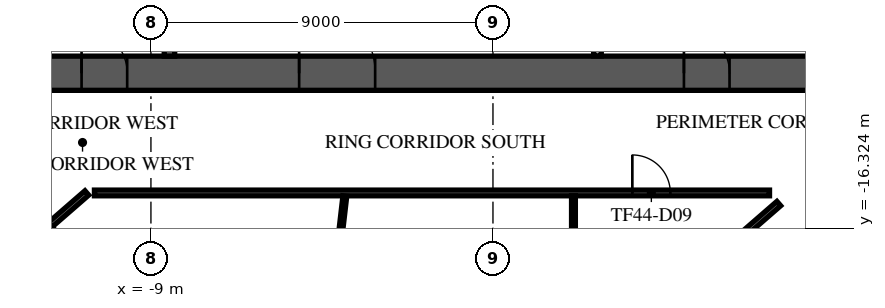
"""IFC4 building model, lengths in metres.
Left out: names, types, materials, properties, quantities, classifications, styles, units other than length and angle.
Written with IfcOpenShell. Run it as: python <this file> out.ifc"""

import sys

from ifc_helpers import new_model, si_unit, direction, frame, frame_2d, origin, place, context, subcontext, project, spatial, rectangle, extrude, element, fill, save


model = new_model("IFC4")
c1 = context("Model", 3, precision=1e-05, world=origin(), true_north=direction((0.0, 1.0)))
c2 = subcontext(c1, "Body", "Model", "MODEL_VIEW")
j1 = project(units=[si_unit("LENGTHUNIT", "METRE"), si_unit("PLANEANGLEUNIT", "RADIAN")], contexts=[c1])
p1 = place(None, origin())
s1 = spatial("IfcSite", under=j1, at=p1, CompositionType="ELEMENT")
p2 = place(p1, origin())
s2 = spatial("IfcBuilding", under=s1, at=p2, CompositionType="ELEMENT")
p3 = place(p2, frame((0.0, 0.0, 189.3)))
s3 = spatial("IfcBuildingStorey", under=s2, at=p3, CompositionType="ELEMENT", Elevation=189.3)
p4 = place(p3, frame((-12.7, -12.25, 0.0), z_axis=(0.0, 0.0, 1.0), x_axis=(1.0, 0.0, 0.0)))
e1 = element("IfcWall", 1, at=p4, inside=s3, PredefinedType="SHEAR", context=c2, shape_type="SweptSolid", body=[
    extrude(rectangle(XDim=25.4, YDim=0.9, at=frame_2d((12.7, 0.0))), origin(), (0.0, 0.0, 1.0), 3.62),
])
p5 = place(p4, frame((7.6, 0.0, 0.0)))
e2 = element("IfcOpeningElement", 2, at=p5, cuts=e1, PredefinedType="OPENING", context=c2, shape_type="SweptSolid", body=[
    extrude(rectangle(XDim=2.0, YDim=2.1, at=frame_2d((1.0, 1.05))), frame((0.0, 0.46, 0.0), z_axis=(0.0, -1.0, 0.0), x_axis=(1.0, 0.0, 0.0)), (0.0, 0.0, 1.0), 0.92),
])
p6 = place(p4, frame((17.725, 0.0, 0.0)))
e3 = element("IfcOpeningElement", 3, at=p6, cuts=e1, PredefinedType="OPENING", context=c2, shape_type="SweptSolid", body=[
    extrude(rectangle(XDim=1.2, YDim=2.1, at=frame_2d((0.6, 1.05))), frame((0.0, 0.46, 0.0), z_axis=(0.0, -1.0, 0.0), x_axis=(1.0, 0.0, 0.0)), (0.0, 0.0, 1.0), 0.92),
])
p7 = place(p4, frame((1.875, 0.0, 0.0)))
e4 = element("IfcOpeningElement", 4, at=p7, cuts=e1, PredefinedType="OPENING", context=c2, shape_type="SweptSolid", body=[
    extrude(rectangle(XDim=1.2, YDim=2.1, at=frame_2d((0.6, 1.05))), frame((0.0, 0.46, 0.0), z_axis=(0.0, -1.0, 0.0), x_axis=(1.0, 0.0, 0.0)), (0.0, 0.0, 1.0), 0.92),
])
p8 = place(p4, frame((22.325, 0.0, 0.0)))
e5 = element("IfcOpeningElement", 5, at=p8, cuts=e1, PredefinedType="OPENING", context=c2, shape_type="SweptSolid", body=[
    extrude(rectangle(XDim=1.2, YDim=2.1, at=frame_2d((0.6, 1.05))), frame((0.0, 0.46, 0.0), z_axis=(0.0, -1.0, 0.0), x_axis=(1.0, 0.0, 0.0)), (0.0, 0.0, 1.0), 0.92),
])
p9 = place(p3, frame((-8.512, -4.55, 0.0), z_axis=(0.0, 0.0, 1.0), x_axis=(0.0, -1.0, 0.0)))
e6 = element("IfcWall", 6, at=p9, inside=s3, PredefinedType="SOLIDWALL", context=c2, shape_type="SweptSolid", body=[
    extrude(rectangle(XDim=7.25, YDim=0.275, at=frame_2d((3.625, 0.0))), origin(), (0.0, 0.0, 1.0), 3.62),
])
p10 = place(p9, frame((6.0, 0.0, 0.0)))
e7 = element("IfcOpeningElement", 7, at=p10, cuts=e6, PredefinedType="OPENING", context=c2, shape_type="SweptSolid", body=[
    extrude(rectangle(XDim=1.0, YDim=2.1, at=frame_2d((0.5, 1.05))), frame((0.0, 0.147, 0.0), z_axis=(0.0, -1.0, 0.0), x_axis=(1.0, 0.0, 0.0)), (0.0, 0.0, 1.0), 0.295),
])
p11 = place(p3, frame((2.75, -11.795, 0.0), z_axis=(0.0, 0.0, 1.0), x_axis=(0.0, 1.0, 0.0)))
e8 = element("IfcWall", 8, at=p11, inside=s3, PredefinedType="PARTITIONING", context=c2, shape_type="SweptSolid", body=[
    extrude(rectangle(XDim=2.99, YDim=0.2, at=frame_2d((1.495, 0.0))), origin(), (0.0, 0.0, 1.0), 3.62),
])
p12 = place(p3, frame((-35.208, -4.768, 0.0), z_axis=(0.0, 0.0, 1.0), x_axis=(0.656058749455, -0.754709823219, 0.0)))
e9 = element("IfcWall", 9, at=p12, inside=s3, PredefinedType="STANDARD", context=c2, shape_type="SweptSolid", body=[
    extrude(rectangle(XDim=39.0, YDim=0.6, at=frame_2d((19.5, 0.0))), origin(), (0.0, 0.0, 1.0), 3.62),
])
p13 = place(p12, frame((1.217, 0.0, 0.9)))
e10 = element("IfcOpeningElement", 10, at=p13, cuts=e9, PredefinedType="OPENING", context=c2, shape_type="SweptSolid", body=[
    extrude(rectangle(XDim=1.9, YDim=2.1, at=frame_2d((0.95, 1.05))), frame((0.0, 0.31, 0.0), z_axis=(0.0, -1.0, 0.0), x_axis=(1.0, 0.0, 0.0)), (0.0, 0.0, 1.0), 0.62),
])
p14 = place(p12, frame((5.55, 0.0, 0.9)))
e11 = element("IfcOpeningElement", 11, at=p14, cuts=e9, PredefinedType="OPENING", context=c2, shape_type="SweptSolid", body=[
    extrude(rectangle(XDim=1.9, YDim=2.1, at=frame_2d((0.95, 1.05))), frame((0.0, 0.31, 0.0), z_axis=(0.0, -1.0, 0.0), x_axis=(1.0, 0.0, 0.0)), (0.0, 0.0, 1.0), 0.62),
])
p15 = place(p12, frame((9.883, 0.0, 0.9)))
e12 = element("IfcOpeningElement", 12, at=p15, cuts=e9, PredefinedType="OPENING", context=c2, shape_type="SweptSolid", body=[
    extrude(rectangle(XDim=1.9, YDim=2.1, at=frame_2d((0.95, 1.05))), frame((0.0, 0.31, 0.0), z_axis=(0.0, -1.0, 0.0), x_axis=(1.0, 0.0, 0.0)), (0.0, 0.0, 1.0), 0.62),
])
p16 = place(p12, frame((14.217, 0.0, 0.9)))
e13 = element("IfcOpeningElement", 13, at=p16, cuts=e9, PredefinedType="OPENING", context=c2, shape_type="SweptSolid", body=[
    extrude(rectangle(XDim=1.9, YDim=2.1, at=frame_2d((0.95, 1.05))), frame((0.0, 0.31, 0.0), z_axis=(0.0, -1.0, 0.0), x_axis=(1.0, 0.0, 0.0)), (0.0, 0.0, 1.0), 0.62),
])
p17 = place(p12, frame((18.55, 0.0, 0.9)))
e14 = element("IfcOpeningElement", 14, at=p17, cuts=e9, PredefinedType="OPENING", context=c2, shape_type="SweptSolid", body=[
    extrude(rectangle(XDim=1.9, YDim=2.1, at=frame_2d((0.95, 1.05))), frame((0.0, 0.31, 0.0), z_axis=(0.0, -1.0, 0.0), x_axis=(1.0, 0.0, 0.0)), (0.0, 0.0, 1.0), 0.62),
])
p18 = place(p12, frame((22.883, 0.0, 0.9)))
e15 = element("IfcOpeningElement", 15, at=p18, cuts=e9, PredefinedType="OPENING", context=c2, shape_type="SweptSolid", body=[
    extrude(rectangle(XDim=1.9, YDim=2.1, at=frame_2d((0.95, 1.05))), frame((0.0, 0.31, 0.0), z_axis=(0.0, -1.0, 0.0), x_axis=(1.0, 0.0, 0.0)), (0.0, 0.0, 1.0), 0.62),
])
p19 = place(p12, frame((27.217, 0.0, 0.9)))
e16 = element("IfcOpeningElement", 16, at=p19, cuts=e9, PredefinedType="OPENING", context=c2, shape_type="SweptSolid", body=[
    extrude(rectangle(XDim=1.9, YDim=2.1, at=frame_2d((0.95, 1.05))), frame((0.0, 0.31, 0.0), z_axis=(0.0, -1.0, 0.0), x_axis=(1.0, 0.0, 0.0)), (0.0, 0.0, 1.0), 0.62),
])
p20 = place(p12, frame((31.55, 0.0, 0.9)))
e17 = element("IfcOpeningElement", 17, at=p20, cuts=e9, PredefinedType="OPENING", context=c2, shape_type="SweptSolid", body=[
    extrude(rectangle(XDim=1.9, YDim=2.1, at=frame_2d((0.95, 1.05))), frame((0.0, 0.31, 0.0), z_axis=(0.0, -1.0, 0.0), x_axis=(1.0, 0.0, 0.0)), (0.0, 0.0, 1.0), 0.62),
])
p21 = place(p12, frame((35.883, 0.0, 0.9)))
e18 = element("IfcOpeningElement", 18, at=p21, cuts=e9, PredefinedType="OPENING", context=c2, shape_type="SweptSolid", body=[
    extrude(rectangle(XDim=1.9, YDim=2.1, at=frame_2d((0.95, 1.05))), frame((0.0, 0.31, 0.0), z_axis=(0.0, -1.0, 0.0), x_axis=(1.0, 0.0, 0.0)), (0.0, 0.0, 1.0), 0.62),
])
p22 = place(p3, frame((-2.286, -34.715, 0.0), z_axis=(0.0, 0.0, 1.0), x_axis=(0.754708272811, 0.656060532993, 0.0)))
e19 = element("IfcWall", 19, at=p22, inside=s3, PredefinedType="STANDARD", context=c2, shape_type="SweptSolid", body=[
    extrude(rectangle(XDim=49.0, YDim=0.6, at=frame_2d((24.5, 0.0))), origin(), (0.0, 0.0, 1.0), 3.62),
])
p23 = place(p22, frame((1.227, 0.0, 0.9)))
e20 = element("IfcOpeningElement", 20, at=p23, cuts=e19, PredefinedType="OPENING", context=c2, shape_type="SweptSolid", body=[
    extrude(rectangle(XDim=2.0, YDim=2.1, at=frame_2d((1.0, 1.05))), frame((0.0, 0.31, 0.0), z_axis=(0.0, -1.0, 0.0), x_axis=(1.0, 0.0, 0.0)), (0.0, 0.0, 1.0), 0.62),
])
p24 = place(p22, frame((5.682, 0.0, 0.9)))
e21 = element("IfcOpeningElement", 21, at=p24, cuts=e19, PredefinedType="OPENING", context=c2, shape_type="SweptSolid", body=[
    extrude(rectangle(XDim=2.0, YDim=2.1, at=frame_2d((1.0, 1.05))), frame((0.0, 0.31, 0.0), z_axis=(0.0, -1.0, 0.0), x_axis=(1.0, 0.0, 0.0)), (0.0, 0.0, 1.0), 0.62),
])
p25 = place(p22, frame((10.136, 0.0, 0.9)))
e22 = element("IfcOpeningElement", 22, at=p25, cuts=e19, PredefinedType="OPENING", context=c2, shape_type="SweptSolid", body=[
    extrude(rectangle(XDim=2.0, YDim=2.1, at=frame_2d((1.0, 1.05))), frame((0.0, 0.31, 0.0), z_axis=(0.0, -1.0, 0.0), x_axis=(1.0, 0.0, 0.0)), (0.0, 0.0, 1.0), 0.62),
])
p26 = place(p22, frame((14.591, 0.0, 0.9)))
e23 = element("IfcOpeningElement", 23, at=p26, cuts=e19, PredefinedType="OPENING", context=c2, shape_type="SweptSolid", body=[
    extrude(rectangle(XDim=2.0, YDim=2.1, at=frame_2d((1.0, 1.05))), frame((0.0, 0.31, 0.0), z_axis=(0.0, -1.0, 0.0), x_axis=(1.0, 0.0, 0.0)), (0.0, 0.0, 1.0), 0.62),
])
p27 = place(p22, frame((19.045, 0.0, 0.9)))
e24 = element("IfcOpeningElement", 24, at=p27, cuts=e19, PredefinedType="OPENING", context=c2, shape_type="SweptSolid", body=[
    extrude(rectangle(XDim=2.0, YDim=2.1, at=frame_2d((1.0, 1.05))), frame((0.0, 0.31, 0.0), z_axis=(0.0, -1.0, 0.0), x_axis=(1.0, 0.0, 0.0)), (0.0, 0.0, 1.0), 0.62),
])
p28 = place(p22, frame((23.5, 0.0, 0.9)))
e25 = element("IfcOpeningElement", 25, at=p28, cuts=e19, PredefinedType="OPENING", context=c2, shape_type="SweptSolid", body=[
    extrude(rectangle(XDim=2.0, YDim=2.1, at=frame_2d((1.0, 1.05))), frame((0.0, 0.31, 0.0), z_axis=(0.0, -1.0, 0.0), x_axis=(1.0, 0.0, 0.0)), (0.0, 0.0, 1.0), 0.62),
])
p29 = place(p22, frame((27.955, 0.0, 0.9)))
e26 = element("IfcOpeningElement", 26, at=p29, cuts=e19, PredefinedType="OPENING", context=c2, shape_type="SweptSolid", body=[
    extrude(rectangle(XDim=2.0, YDim=2.1, at=frame_2d((1.0, 1.05))), frame((0.0, 0.31, 0.0), z_axis=(0.0, -1.0, 0.0), x_axis=(1.0, 0.0, 0.0)), (0.0, 0.0, 1.0), 0.62),
])
p30 = place(p22, frame((32.409, 0.0, 0.9)))
e27 = element("IfcOpeningElement", 27, at=p30, cuts=e19, PredefinedType="OPENING", context=c2, shape_type="SweptSolid", body=[
    extrude(rectangle(XDim=2.0, YDim=2.1, at=frame_2d((1.0, 1.05))), frame((0.0, 0.31, 0.0), z_axis=(0.0, -1.0, 0.0), x_axis=(1.0, 0.0, 0.0)), (0.0, 0.0, 1.0), 0.62),
])
p31 = place(p22, frame((36.864, 0.0, 0.9)))
e28 = element("IfcOpeningElement", 28, at=p31, cuts=e19, PredefinedType="OPENING", context=c2, shape_type="SweptSolid", body=[
    extrude(rectangle(XDim=2.0, YDim=2.1, at=frame_2d((1.0, 1.05))), frame((0.0, 0.31, 0.0), z_axis=(0.0, -1.0, 0.0), x_axis=(1.0, 0.0, 0.0)), (0.0, 0.0, 1.0), 0.62),
])
p32 = place(p22, frame((41.318, 0.0, 0.9)))
e29 = element("IfcOpeningElement", 29, at=p32, cuts=e19, PredefinedType="OPENING", context=c2, shape_type="SweptSolid", body=[
    extrude(rectangle(XDim=2.0, YDim=2.1, at=frame_2d((1.0, 1.05))), frame((0.0, 0.31, 0.0), z_axis=(0.0, -1.0, 0.0), x_axis=(1.0, 0.0, 0.0)), (0.0, 0.0, 1.0), 0.62),
])
p33 = place(p22, frame((45.773, 0.0, 0.9)))
e30 = element("IfcOpeningElement", 30, at=p33, cuts=e19, PredefinedType="OPENING", context=c2, shape_type="SweptSolid", body=[
    extrude(rectangle(XDim=2.0, YDim=2.1, at=frame_2d((1.0, 1.05))), frame((0.0, 0.31, 0.0), z_axis=(0.0, -1.0, 0.0), x_axis=(1.0, 0.0, 0.0)), (0.0, 0.0, 1.0), 0.62),
])
p34 = place(p3, frame((-24.98, -4.673, 0.0), z_axis=(0.0, 0.0, 1.0), x_axis=(0.656048444225, -0.754718781289, 0.0)))
e31 = element("IfcWall", 31, at=p34, inside=s3, PredefinedType="PARTITIONING", context=c2, shape_type="SweptSolid", body=[
    extrude(rectangle(XDim=25.8, YDim=0.15, at=frame_2d((12.9, 0.0))), origin(), (0.0, 0.0, 1.0), 3.17),
])
p35 = place(p34, frame((12.071, 0.0, 0.0)))
e32 = element("IfcOpeningElement", 32, at=p35, cuts=e31, PredefinedType="OPENING", context=c2, shape_type="SweptSolid", body=[
    extrude(rectangle(XDim=1.0, YDim=2.1, at=frame_2d((0.5, 1.05))), frame((0.0, 0.085, 0.0), z_axis=(0.0, -1.0, 0.0), x_axis=(1.0, 0.0, 0.0)), (0.0, 0.0, 1.0), 0.17),
])
p36 = place(p34, frame((24.318, 0.0, 0.0)))
e33 = element("IfcOpeningElement", 33, at=p36, cuts=e31, PredefinedType="OPENING", context=c2, shape_type="SweptSolid", body=[
    extrude(rectangle(XDim=1.0, YDim=2.1, at=frame_2d((0.5, 1.05))), frame((0.0, 0.085, 0.0), z_axis=(0.0, -1.0, 0.0), x_axis=(1.0, 0.0, 0.0)), (0.0, 0.0, 1.0), 0.17),
])
p37 = place(p3, frame((-11.705, -16.285, 0.0), z_axis=(0.0, 0.0, 1.0), x_axis=(0.656018266208, -0.754745012837, 0.0)))
e34 = element("IfcWall", 34, at=p37, inside=s3, PredefinedType="PARTITIONING", context=c2, shape_type="SweptSolid", body=[
    extrude(rectangle(XDim=8.326, YDim=0.15, at=frame_2d((4.163, 0.0))), origin(), (0.0, 0.0, 1.0), 3.17),
])
p38 = place(p3, frame((-11.648, -16.236, 0.0), z_axis=(0.0, 0.0, 1.0), x_axis=(0.754638525281, 0.656140759412, 0.0)))
e35 = element("IfcWall", 35, at=p38, inside=s3, PredefinedType="PARTITIONING", context=c2, shape_type="SweptSolid", body=[
    extrude(rectangle(XDim=1.274, YDim=0.15, at=frame_2d((0.637, 0.0))), origin(), (0.0, 0.0, 1.0), 3.17),
])
p39 = place(p3, frame((-10.486, -15.4, 0.0), z_axis=(0.0, 0.0, 1.0), x_axis=(1.0, 0.0, 0.0)))
e36 = element("IfcWall", 36, at=p39, inside=s3, PredefinedType="PARTITIONING", context=c2, shape_type="SweptSolid", body=[
    extrude(rectangle(XDim=17.763, YDim=0.15, at=frame_2d((8.882, 0.0))), origin(), (0.0, 0.0, 1.0), 3.17),
])
p40 = place(p39, frame((14.154, 0.0, 0.0)))
e37 = element("IfcOpeningElement", 37, at=p40, cuts=e36, PredefinedType="OPENING", context=c2, shape_type="SweptSolid", body=[
    extrude(rectangle(XDim=1.0, YDim=2.1, at=frame_2d((0.5, 1.05))), frame((0.0, 0.085, 0.0), z_axis=(0.0, -1.0, 0.0), x_axis=(1.0, 0.0, 0.0)), (0.0, 0.0, 1.0), 0.17),
])
p41 = place(p3, frame((-2.631, -24.505, 0.0), z_axis=(0.0, 0.0, 1.0), x_axis=(0.754714526528, 0.656053338874, 0.0)))
e38 = element("IfcWall", 38, at=p41, inside=s3, PredefinedType="PARTITIONING", context=c2, shape_type="SweptSolid", body=[
    extrude(rectangle(XDim=13.452, YDim=0.15, at=frame_2d((6.726, 0.0))), origin(), (0.0, 0.0, 1.0), 3.17),
])
p42 = place(p41, frame((3.05, 0.0, 0.0)))
e39 = element("IfcOpeningElement", 39, at=p42, cuts=e38, PredefinedType="OPENING", context=c2, shape_type="SweptSolid", body=[
    extrude(rectangle(XDim=1.0, YDim=2.1, at=frame_2d((0.5, 1.05))), frame((0.0, 0.085, 0.0), z_axis=(0.0, -1.0, 0.0), x_axis=(1.0, 0.0, 0.0)), (0.0, 0.0, 1.0), 0.17),
])
p43 = place(p3, frame((-1.0, -26.268, 0.0), z_axis=(0.0, 0.0, 1.0), x_axis=(0.754711356604, 0.656056985492, 0.0)))
e40 = element("IfcWall", 40, at=p43, inside=s3, PredefinedType="PARTITIONING", context=c2, shape_type="SweptSolid", body=[
    extrude(rectangle(XDim=36.052, YDim=0.15, at=frame_2d((18.026, 0.0))), origin(), (0.0, 0.0, 1.0), 3.17),
])
p44 = place(p43, frame((9.598, 0.0, 0.0)))
e41 = element("IfcOpeningElement", 41, at=p44, cuts=e40, PredefinedType="OPENING", context=c2, shape_type="SweptSolid", body=[
    extrude(rectangle(XDim=1.0, YDim=2.1, at=frame_2d((0.5, 1.05))), frame((0.0, 0.085, 0.0), z_axis=(0.0, -1.0, 0.0), x_axis=(1.0, 0.0, 0.0)), (0.0, 0.0, 1.0), 0.17),
])
p45 = place(p43, frame((20.957, 0.0, 0.0)))
e42 = element("IfcOpeningElement", 42, at=p45, cuts=e40, PredefinedType="OPENING", context=c2, shape_type="SweptSolid", body=[
    extrude(rectangle(XDim=1.0, YDim=2.1, at=frame_2d((0.5, 1.05))), frame((0.0, 0.085, 0.0), z_axis=(0.0, -1.0, 0.0), x_axis=(1.0, 0.0, 0.0)), (0.0, 0.0, 1.0), 0.17),
])
p46 = place(p43, frame((27.87, 0.0, 0.0)))
e43 = element("IfcOpeningElement", 43, at=p46, cuts=e40, PredefinedType="OPENING", context=c2, shape_type="SweptSolid", body=[
    extrude(rectangle(XDim=1.8, YDim=2.1, at=frame_2d((0.9, 1.05))), frame((0.0, 0.085, 0.0), z_axis=(0.0, -1.0, 0.0), x_axis=(1.0, 0.0, 0.0)), (0.0, 0.0, 1.0), 0.17),
])
p47 = place(p3, frame((-5.674, -30.833, 0.0), z_axis=(0.0, 0.0, 1.0), x_axis=(0.114957483757, 0.993370412751, 0.0)))
e44 = element("IfcWall", 44, at=p47, inside=s3, PredefinedType="PARTITIONING", context=c2, shape_type="SweptSolid", body=[
    extrude(rectangle(XDim=15.455, YDim=0.1, at=frame_2d((7.727, 0.0))), origin(), (0.0, 0.0, 1.0), 3.62),
])
p48 = place(p3, frame((2.118, -20.234, 0.0), z_axis=(0.0, 0.0, 1.0), x_axis=(0.0, 1.0, 0.0)))
e45 = element("IfcWall", 45, at=p48, inside=s3, PredefinedType="PARTITIONING", context=c2, shape_type="SweptSolid", body=[
    extrude(rectangle(XDim=4.759, YDim=0.1, at=frame_2d((2.379, 0.0))), origin(), (0.0, 0.0, 1.0), 3.17),
])
p49 = place(p5, origin())
e46 = element("IfcDoor", 46, at=p49, inside=s3, OperationType="SINGLE_SWING_LEFT", PredefinedType="DOOR", context=c2, shape_type="SweptSolid", body=[
    extrude(rectangle(XDim=2.0, YDim=2.1, at=frame_2d((1.0, 1.05))), frame((0.0, 0.025, 0.0), z_axis=(0.0, -1.0, 0.0), x_axis=(1.0, 0.0, 0.0)), (0.0, 0.0, 1.0), 0.05),
])
fill(e2, e46)
p50 = place(p6, origin())
e47 = element("IfcDoor", 47, at=p50, inside=s3, OperationType="SINGLE_SWING_LEFT", PredefinedType="DOOR", context=c2, shape_type="SweptSolid", body=[
    extrude(rectangle(XDim=1.2, YDim=2.1, at=frame_2d((0.6, 1.05))), frame((0.0, 0.025, 0.0), z_axis=(0.0, -1.0, 0.0), x_axis=(1.0, 0.0, 0.0)), (0.0, 0.0, 1.0), 0.05),
])
fill(e3, e47)
p51 = place(p7, origin())
e48 = element("IfcDoor", 48, at=p51, inside=s3, OperationType="SINGLE_SWING_LEFT", PredefinedType="DOOR", context=c2, shape_type="SweptSolid", body=[
    extrude(rectangle(XDim=1.2, YDim=2.1, at=frame_2d((0.6, 1.05))), frame((0.0, 0.025, 0.0), z_axis=(0.0, -1.0, 0.0), x_axis=(1.0, 0.0, 0.0)), (0.0, 0.0, 1.0), 0.05),
])
fill(e4, e48)
p52 = place(p40, frame((1.0, 0.0, 0.0), z_axis=(0.0, 0.0, 1.0), x_axis=(-1.0, 0.0, 0.0)))
e49 = element("IfcDoor", 49, at=p52, inside=s3, OperationType="SINGLE_SWING_LEFT", PredefinedType="DOOR", context=c2, shape_type="SweptSolid", body=[
    extrude(rectangle(XDim=1.0, YDim=2.1, at=frame_2d((0.5, 1.05))), frame((0.0, 0.025, 0.0), z_axis=(0.0, -1.0, 0.0), x_axis=(1.0, 0.0, 0.0)), (0.0, 0.0, 1.0), 0.05),
])
fill(e37, e49)
save(model, sys.argv[1])
